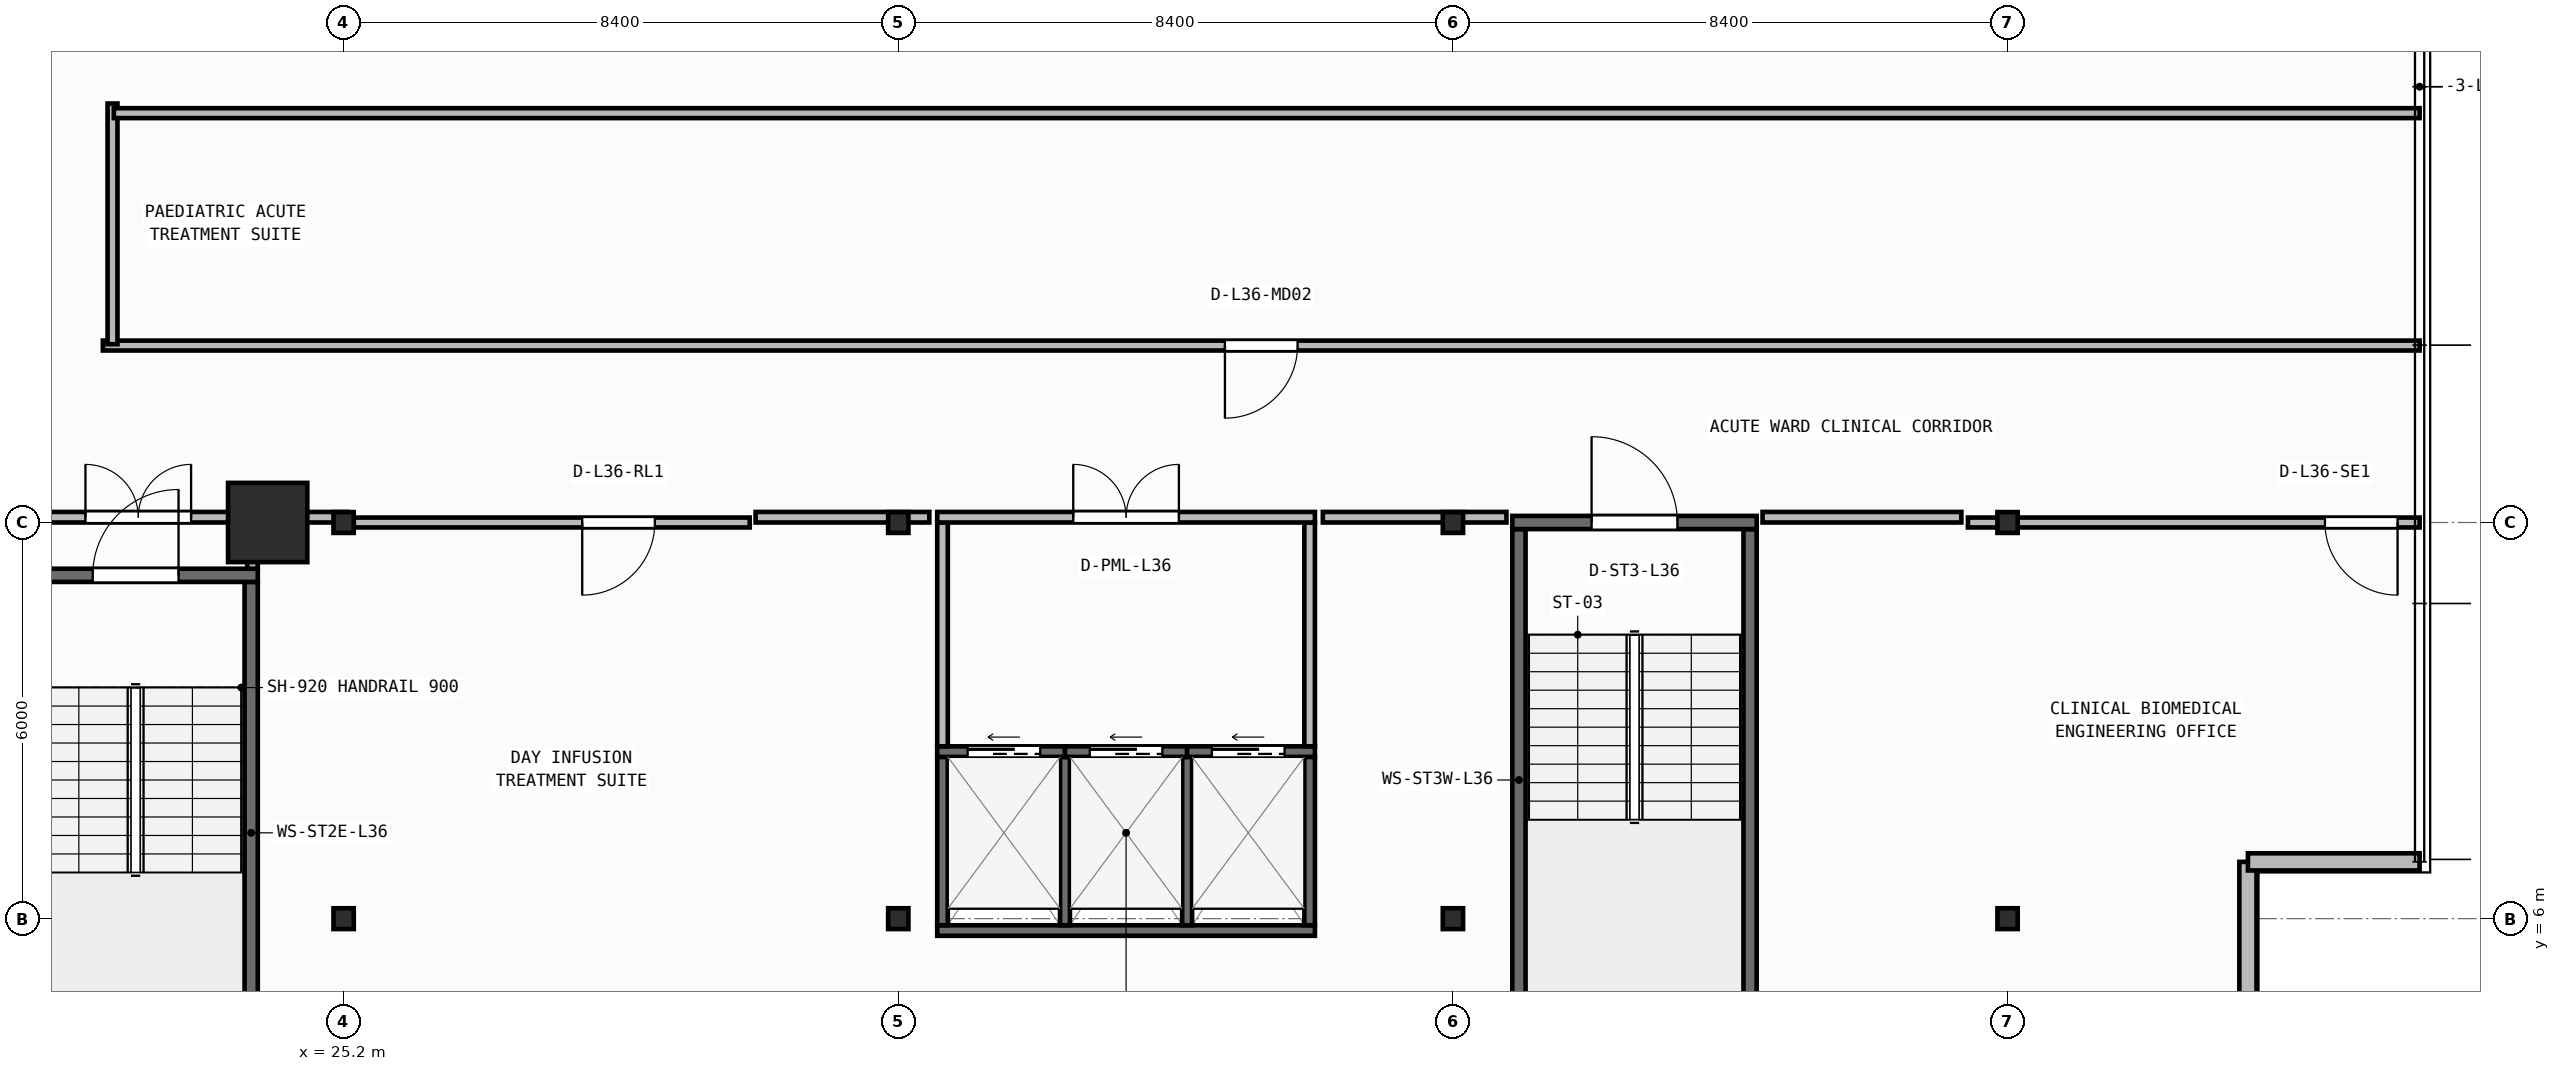
"""IFC4 building model, lengths in metres.
Left out: names, types, materials, properties, quantities, classifications, styles, units other than length and angle.
Written with IfcOpenShell. Run it as: python <this file> out.ifc"""

import sys

from ifc_helpers import new_model, si_unit, direction, frame, frame_2d, origin, origin_2d, place, context, subcontext, project, spatial, rectangle, i_section, extrude, element, fill, save


model = new_model("IFC4")
c1 = context("Model", 3, precision=1e-05, world=origin(), true_north=direction((0.0, 1.0)))
c2 = subcontext(c1, "Body", "Model", "MODEL_VIEW")
j1 = project(units=[si_unit("LENGTHUNIT", "METRE"), si_unit("PLANEANGLEUNIT", "RADIAN")], contexts=[c1])
p1 = place(None, origin())
s1 = spatial("IfcSite", under=j1, at=p1, CompositionType="ELEMENT")
p2 = place(p1, origin())
s2 = spatial("IfcBuilding", under=s1, at=p2, CompositionType="ELEMENT")
p3 = place(p2, frame((0.0, 0.0, 146.8)))
s3 = spatial("IfcBuildingStorey", under=s2, at=p3, CompositionType="ELEMENT", Elevation=146.8)
for number, where, z_axis, x_axis in (
    (1, (25.2, 6.0, 0.0), (0.0, 0.0, 1.0), (1.0, 0.0, 0.0)),
    (2, (33.6, 6.0, 0.0), (0.0, 0.0, 1.0), (1.0, 0.0, 0.0)),
    (3, (42.0, 6.0, 0.0), (0.0, 0.0, 1.0), (1.0, 0.0, 0.0)),
    (4, (50.4, 6.0, 0.0), (0.0, 0.0, 1.0), (1.0, 0.0, 0.0)),
):
    element("IfcColumn", number, at=place(p3, frame(where, z_axis=z_axis, x_axis=x_axis)), inside=s3, PredefinedType="COLUMN", context=c2, shape_type="SweptSolid", body=[
        extrude(i_section(OverallWidth=0.307, OverallDepth=0.315, WebThickness=0.012, FlangeThickness=0.019, FilletRadius=0.017, at=origin_2d()), origin(), (0.0, 0.0, 1.0), 3.95),
    ])
p4 = place(p3, frame((24.05, 12.0, 0.0), z_axis=(0.0, 0.0, 1.0), x_axis=(1.0, 0.0, 0.0)))
e5 = element("IfcColumn", 5, at=p4, inside=s3, PredefinedType="COLUMN", context=c2, shape_type="SweptSolid", body=[
    extrude(rectangle(XDim=1.2, YDim=1.2, at=origin_2d()), origin(), (0.0, 0.0, 1.0), 3.95),
])
for number, where, z_axis, x_axis in (
    (6, (25.2, 12.0, 0.0), (0.0, 0.0, 1.0), (1.0, 0.0, 0.0)),
    (7, (33.6, 12.0, 0.0), (0.0, 0.0, 1.0), (1.0, 0.0, 0.0)),
    (8, (42.0, 12.0, 0.0), (0.0, 0.0, 1.0), (1.0, 0.0, 0.0)),
    (9, (50.4, 12.0, 0.0), (0.0, 0.0, 1.0), (1.0, 0.0, 0.0)),
):
    element("IfcColumn", number, at=place(p3, frame(where, z_axis=z_axis, x_axis=x_axis)), inside=s3, PredefinedType="COLUMN", context=c2, shape_type="SweptSolid", body=[
        extrude(i_section(OverallWidth=0.307, OverallDepth=0.315, WebThickness=0.012, FlangeThickness=0.019, FilletRadius=0.017, at=origin_2d()), origin(), (0.0, 0.0, 1.0), 3.95),
    ])
p5 = place(p3, frame((54.04, 4.248, 0.0), z_axis=(0.0, 0.0, 1.0), x_axis=(0.0, 1.0, 0.0)))
e10 = element("IfcWall", 10, at=p5, inside=s3, PredefinedType="STANDARD", context=c2, shape_type="SweptSolid", body=[
    extrude(rectangle(XDim=2.612, YDim=0.26, at=frame_2d((1.306, 0.0))), origin(), (0.0, 0.0, 1.0), 3.71),
])
p6 = place(p3, frame((54.04, 6.86, 0.0), z_axis=(0.0, 0.0, 1.0), x_axis=(1.0, 0.0, 0.0)))
e11 = element("IfcWall", 11, at=p6, inside=s3, PredefinedType="STANDARD", context=c2, shape_type="SweptSolid", body=[
    extrude(rectangle(XDim=2.6, YDim=0.26, at=frame_2d((1.3, 0.0))), origin(), (0.0, 0.0, 1.0), 3.71),
])
p7 = place(p3, frame((23.8, 3.5, 0.0), z_axis=(0.0, 0.0, 1.0), x_axis=(0.0, 1.0, 0.0)))
e12 = element("IfcWall", 12, at=p7, inside=s3, PredefinedType="SHEAR", context=c2, shape_type="SweptSolid", body=[
    extrude(rectangle(XDim=7.6, YDim=0.2, at=frame_2d((3.8, 0.0))), origin(), (0.0, 0.0, 1.0), 3.71),
])
p8 = place(p3, frame((20.2, 11.2, 0.0), z_axis=(0.0, 0.0, 1.0), x_axis=(1.0, 0.0, 0.0)))
e13 = element("IfcWall", 13, at=p8, inside=s3, PredefinedType="SHEAR", context=c2, shape_type="SweptSolid", body=[
    extrude(rectangle(XDim=3.7, YDim=0.2, at=frame_2d((1.85, 0.0))), origin(), (0.0, 0.0, 1.0), 3.71),
])
p9 = place(p8, frame((1.2, 0.0, 0.0)))
e14 = element("IfcOpeningElement", 14, at=p9, cuts=e13, PredefinedType="OPENING", context=c2, shape_type="SweptSolid", body=[
    extrude(rectangle(XDim=1.3, YDim=2.15, at=frame_2d((0.65, 1.075))), frame((0.0, 0.11, 0.0), z_axis=(0.0, -1.0, 0.0), x_axis=(1.0, 0.0, 0.0)), (0.0, 0.0, 1.0), 0.22),
])
for number, where, z_axis, x_axis in (
    (15, (43.0, 4.3, 0.0), (0.0, 0.0, 1.0), (0.0, 1.0, 0.0)),
    (16, (46.5, 4.3, 0.0), (0.0, 0.0, 1.0), (0.0, 1.0, 0.0)),
):
    element("IfcWall", number, at=place(p3, frame(where, z_axis=z_axis, x_axis=x_axis)), inside=s3, PredefinedType="SHEAR", context=c2, shape_type="SweptSolid", body=[
        extrude(rectangle(XDim=7.6, YDim=0.2, at=frame_2d((3.8, 0.0))), origin(), (0.0, 0.0, 1.0), 3.71),
    ])
p10 = place(p3, frame((42.9, 12.0, 0.0), z_axis=(0.0, 0.0, 1.0), x_axis=(1.0, 0.0, 0.0)))
e17 = element("IfcWall", 17, at=p10, inside=s3, PredefinedType="SHEAR", context=c2, shape_type="SweptSolid", body=[
    extrude(rectangle(XDim=3.7, YDim=0.2, at=frame_2d((1.85, 0.0))), origin(), (0.0, 0.0, 1.0), 3.71),
])
p11 = place(p10, frame((1.2, 0.0, 0.0)))
e18 = element("IfcOpeningElement", 18, at=p11, cuts=e17, PredefinedType="OPENING", context=c2, shape_type="SweptSolid", body=[
    extrude(rectangle(XDim=1.3, YDim=2.15, at=frame_2d((0.65, 1.075))), frame((0.0, 0.11, 0.0), z_axis=(0.0, -1.0, 0.0), x_axis=(1.0, 0.0, 0.0)), (0.0, 0.0, 1.0), 0.22),
])
p12 = place(p3, frame((34.19, 5.82, 0.0), z_axis=(0.0, 0.0, 1.0), x_axis=(1.0, 0.0, 0.0)))
e19 = element("IfcWall", 19, at=p12, inside=s3, PredefinedType="SHEAR", context=c2, shape_type="SweptSolid", body=[
    extrude(rectangle(XDim=5.72, YDim=0.16, at=frame_2d((2.86, 0.0))), origin(), (0.0, 0.0, 1.0), 3.71),
])
for number, where, z_axis, x_axis in (
    (20, (34.27, 5.9, 0.0), (0.0, 0.0, 1.0), (0.0, 1.0, 0.0)),
    (21, (39.83, 5.9, 0.0), (0.0, 0.0, 1.0), (0.0, 1.0, 0.0)),
):
    element("IfcWall", number, at=place(p3, frame(where, z_axis=z_axis, x_axis=x_axis)), inside=s3, PredefinedType="SHEAR", context=c2, shape_type="SweptSolid", body=[
        extrude(rectangle(XDim=2.55, YDim=0.16, at=frame_2d((1.275, 0.0))), origin(), (0.0, 0.0, 1.0), 3.71),
    ])
for number, where, z_axis, x_axis in (
    (22, (36.125, 5.9, 0.0), (0.0, 0.0, 1.0), (0.0, 1.0, 0.0)),
    (23, (37.975, 5.9, 0.0), (0.0, 0.0, 1.0), (0.0, 1.0, 0.0)),
):
    element("IfcWall", number, at=place(p3, frame(where, z_axis=z_axis, x_axis=x_axis)), inside=s3, PredefinedType="SHEAR", context=c2, shape_type="SweptSolid", body=[
        extrude(rectangle(XDim=2.55, YDim=0.15, at=frame_2d((1.275, 0.0))), origin(), (0.0, 0.0, 1.0), 3.71),
    ])
p13 = place(p3, frame((34.19, 8.53, 0.0), z_axis=(0.0, 0.0, 1.0), x_axis=(1.0, 0.0, 0.0)))
e24 = element("IfcWall", 24, at=p13, inside=s3, PredefinedType="SHEAR", context=c2, shape_type="SweptSolid", body=[
    extrude(rectangle(XDim=1.935, YDim=0.16, at=frame_2d((0.968, 0.0))), origin(), (0.0, 0.0, 1.0), 3.71),
])
p14 = place(p13, frame((0.46, 0.0, 0.0)))
e25 = element("IfcOpeningElement", 25, at=p14, cuts=e24, PredefinedType="OPENING", context=c2, shape_type="SweptSolid", body=[
    extrude(rectangle(XDim=1.1, YDim=2.15, at=frame_2d((0.55, 1.075))), frame((0.0, 0.09, 0.0), z_axis=(0.0, -1.0, 0.0), x_axis=(1.0, 0.0, 0.0)), (0.0, 0.0, 1.0), 0.18),
])
p15 = place(p3, frame((36.125, 8.53, 0.0), z_axis=(0.0, 0.0, 1.0), x_axis=(1.0, 0.0, 0.0)))
e26 = element("IfcWall", 26, at=p15, inside=s3, PredefinedType="SHEAR", context=c2, shape_type="SweptSolid", body=[
    extrude(rectangle(XDim=1.85, YDim=0.16, at=frame_2d((0.925, 0.0))), origin(), (0.0, 0.0, 1.0), 3.71),
])
p16 = place(p15, frame((0.375, 0.0, 0.0)))
e27 = element("IfcOpeningElement", 27, at=p16, cuts=e26, PredefinedType="OPENING", context=c2, shape_type="SweptSolid", body=[
    extrude(rectangle(XDim=1.1, YDim=2.15, at=frame_2d((0.55, 1.075))), frame((0.0, 0.09, 0.0), z_axis=(0.0, -1.0, 0.0), x_axis=(1.0, 0.0, 0.0)), (0.0, 0.0, 1.0), 0.18),
])
p17 = place(p3, frame((37.975, 8.53, 0.0), z_axis=(0.0, 0.0, 1.0), x_axis=(1.0, 0.0, 0.0)))
e28 = element("IfcWall", 28, at=p17, inside=s3, PredefinedType="SHEAR", context=c2, shape_type="SweptSolid", body=[
    extrude(rectangle(XDim=1.935, YDim=0.16, at=frame_2d((0.967, 0.0))), origin(), (0.0, 0.0, 1.0), 3.71),
])
p18 = place(p17, frame((0.375, 0.0, 0.0)))
e29 = element("IfcOpeningElement", 29, at=p18, cuts=e28, PredefinedType="OPENING", context=c2, shape_type="SweptSolid", body=[
    extrude(rectangle(XDim=1.1, YDim=2.15, at=frame_2d((0.55, 1.075))), frame((0.0, 0.09, 0.0), z_axis=(0.0, -1.0, 0.0), x_axis=(1.0, 0.0, 0.0)), (0.0, 0.0, 1.0), 0.18),
])
p19 = place(p3, frame((20.28, 12.08, 0.0), z_axis=(0.0, 0.0, 1.0), x_axis=(1.0, 0.0, 0.0)))
e30 = element("IfcWall", 30, at=p19, inside=s3, PredefinedType="PARTITIONING", context=c2, shape_type="SweptSolid", body=[
    extrude(rectangle(XDim=3.62, YDim=0.16, at=frame_2d((1.81, 0.0))), origin(), (0.0, 0.0, 1.0), 3.083),
])
p20 = place(p19, frame((1.01, 0.0, 0.0)))
e31 = element("IfcOpeningElement", 31, at=p20, cuts=e30, PredefinedType="OPENING", context=c2, shape_type="SweptSolid", body=[
    extrude(rectangle(XDim=1.6, YDim=2.05, at=frame_2d((0.8, 1.025))), frame((0.0, 0.09, 0.0), z_axis=(0.0, -1.0, 0.0), x_axis=(1.0, 0.0, 0.0)), (0.0, 0.0, 1.0), 0.18),
])
p21 = place(p3, frame((23.82, 11.3, 0.0), z_axis=(0.0, 0.0, 1.0), x_axis=(0.0, 1.0, 0.0)))
e32 = element("IfcWall", 32, at=p21, inside=s3, PredefinedType="PARTITIONING", context=c2, shape_type="SweptSolid", body=[
    extrude(rectangle(XDim=0.7, YDim=0.16, at=frame_2d((0.35, 0.0))), origin(), (0.0, 0.0, 1.0), 3.71),
])
for number, where, z_axis, x_axis in (
    (33, (34.27, 8.61, 0.0), (0.0, 0.0, 1.0), (0.0, 1.0, 0.0)),
    (34, (39.83, 8.61, 0.0), (0.0, 0.0, 1.0), (0.0, 1.0, 0.0)),
):
    element("IfcWall", number, at=place(p3, frame(where, z_axis=z_axis, x_axis=x_axis)), inside=s3, PredefinedType="PARTITIONING", context=c2, shape_type="SweptSolid", body=[
        extrude(rectangle(XDim=3.39, YDim=0.16, at=frame_2d((1.695, 0.0))), origin(), (0.0, 0.0, 1.0), 3.71),
    ])
p22 = place(p3, frame((34.19, 12.08, 0.0), z_axis=(0.0, 0.0, 1.0), x_axis=(1.0, 0.0, 0.0)))
e35 = element("IfcWall", 35, at=p22, inside=s3, PredefinedType="PARTITIONING", context=c2, shape_type="SweptSolid", body=[
    extrude(rectangle(XDim=5.72, YDim=0.16, at=frame_2d((2.86, 0.0))), origin(), (0.0, 0.0, 1.0), 3.083),
])
p23 = place(p22, frame((2.06, 0.0, 0.0)))
e36 = element("IfcOpeningElement", 36, at=p23, cuts=e35, PredefinedType="OPENING", context=c2, shape_type="SweptSolid", body=[
    extrude(rectangle(XDim=1.6, YDim=2.05, at=frame_2d((0.8, 1.025))), frame((0.0, 0.09, 0.0), z_axis=(0.0, -1.0, 0.0), x_axis=(1.0, 0.0, 0.0)), (0.0, 0.0, 1.0), 0.18),
])
p24 = place(p3, frame((31.35, 12.0, 0.0), z_axis=(0.0, 0.0, 1.0), x_axis=(-1.0, 0.0, 0.0)))
e37 = element("IfcWall", 37, at=p24, inside=s3, PredefinedType="PARTITIONING", context=c2, shape_type="SweptSolid", body=[
    extrude(rectangle(XDim=5.997, YDim=0.15, at=frame_2d((2.998, 0.0))), origin(), (0.0, 0.0, 1.0), 3.083),
])
p25 = place(p24, frame((1.437, 0.0, 0.0)))
e38 = element("IfcOpeningElement", 38, at=p25, cuts=e37, PredefinedType="OPENING", context=c2, shape_type="SweptSolid", body=[
    extrude(rectangle(XDim=1.1, YDim=2.1, at=frame_2d((0.55, 1.05))), frame((0.0, 0.085, 0.0), z_axis=(0.0, -1.0, 0.0), x_axis=(1.0, 0.0, 0.0)), (0.0, 0.0, 1.0), 0.17),
])
p26 = place(p3, frame((56.64, 12.0, 0.0), z_axis=(0.0, 0.0, 1.0), x_axis=(-1.0, 0.0, 0.0)))
e39 = element("IfcWall", 39, at=p26, inside=s3, PredefinedType="PARTITIONING", context=c2, shape_type="SweptSolid", body=[
    extrude(rectangle(XDim=6.84, YDim=0.15, at=frame_2d((3.42, 0.0))), origin(), (0.0, 0.0, 1.0), 3.083),
])
p27 = place(p26, frame((0.333, 0.0, 0.0)))
e40 = element("IfcOpeningElement", 40, at=p27, cuts=e39, PredefinedType="OPENING", context=c2, shape_type="SweptSolid", body=[
    extrude(rectangle(XDim=1.1, YDim=2.1, at=frame_2d((0.55, 1.05))), frame((0.0, 0.085, 0.0), z_axis=(0.0, -1.0, 0.0), x_axis=(1.0, 0.0, 0.0)), (0.0, 0.0, 1.0), 0.17),
])
p28 = place(p3, frame((56.64, 14.68, 0.0), z_axis=(0.0, 0.0, 1.0), x_axis=(-1.0, 0.0, 0.0)))
e41 = element("IfcWall", 41, at=p28, inside=s3, PredefinedType="PARTITIONING", context=c2, shape_type="SweptSolid", body=[
    extrude(rectangle(XDim=35.086, YDim=0.15, at=frame_2d((17.543, 0.0))), origin(), (0.0, 0.0, 1.0), 3.71),
])
p29 = place(p28, frame((16.993, 0.0, 0.0)))
e42 = element("IfcOpeningElement", 42, at=p29, cuts=e41, PredefinedType="OPENING", context=c2, shape_type="SweptSolid", body=[
    extrude(rectangle(XDim=1.1, YDim=2.1, at=frame_2d((0.55, 1.05))), frame((0.0, 0.085, 0.0), z_axis=(0.0, -1.0, 0.0), x_axis=(1.0, 0.0, 0.0)), (0.0, 0.0, 1.0), 0.17),
])
p30 = place(p3, frame((21.7, 14.7, 0.0), z_axis=(0.0, 0.0, 1.0), x_axis=(0.0, 1.0, 0.0)))
e43 = element("IfcWall", 43, at=p30, inside=s3, PredefinedType="PARTITIONING", context=c2, shape_type="SweptSolid", body=[
    extrude(rectangle(XDim=3.646, YDim=0.15, at=frame_2d((1.823, 0.0))), origin(), (0.0, 0.0, 1.0), 3.71),
])
p31 = place(p3, frame((21.72, 18.2, 0.0), z_axis=(0.0, 0.0, 1.0), x_axis=(1.0, 0.0, 0.0)))
e44 = element("IfcWall", 44, at=p31, inside=s3, PredefinedType="PARTITIONING", context=c2, shape_type="SweptSolid", body=[
    extrude(rectangle(XDim=34.92, YDim=0.15, at=frame_2d((17.46, 0.0))), origin(), (0.0, 0.0, 1.0), 3.71),
])
p32 = place(p3, frame((24.02, 12.08, 0.0), z_axis=(0.0, 0.0, 1.0), x_axis=(1.0, 0.0, 0.0)))
e45 = element("IfcWall", 45, at=p32, inside=s3, PredefinedType="PARTITIONING", context=c2, shape_type="SweptSolid", body=[
    extrude(rectangle(XDim=1.244, YDim=0.16, at=frame_2d((0.622, 0.0))), origin(), (0.0, 0.0, 1.0), 3.083),
])
p33 = place(p3, frame((31.439, 12.08, 0.0), z_axis=(0.0, 0.0, 1.0), x_axis=(1.0, 0.0, 0.0)))
e46 = element("IfcWall", 46, at=p33, inside=s3, PredefinedType="PARTITIONING", context=c2, shape_type="SweptSolid", body=[
    extrude(rectangle(XDim=2.631, YDim=0.16, at=frame_2d((1.315, 0.0))), origin(), (0.0, 0.0, 1.0), 3.083),
])
p34 = place(p3, frame((40.03, 12.08, 0.0), z_axis=(0.0, 0.0, 1.0), x_axis=(1.0, 0.0, 0.0)))
e47 = element("IfcWall", 47, at=p34, inside=s3, PredefinedType="PARTITIONING", context=c2, shape_type="SweptSolid", body=[
    extrude(rectangle(XDim=2.781, YDim=0.16, at=frame_2d((1.39, 0.0))), origin(), (0.0, 0.0, 1.0), 3.083),
])
p35 = place(p3, frame((46.689, 12.08, 0.0), z_axis=(0.0, 0.0, 1.0), x_axis=(1.0, 0.0, 0.0)))
e48 = element("IfcWall", 48, at=p35, inside=s3, PredefinedType="PARTITIONING", context=c2, shape_type="SweptSolid", body=[
    extrude(rectangle(XDim=3.011, YDim=0.16, at=frame_2d((1.505, 0.0))), origin(), (0.0, 0.0, 1.0), 3.083),
])
p36 = place(p9, origin())
e49 = element("IfcDoor", 49, at=p36, inside=s3, OperationType="SINGLE_SWING_RIGHT", PredefinedType="DOOR", context=c2, shape_type="SweptSolid", body=[
    extrude(rectangle(XDim=1.3, YDim=2.15, at=frame_2d((0.65, 1.075))), frame((0.0, 0.025, 0.0), z_axis=(0.0, -1.0, 0.0), x_axis=(1.0, 0.0, 0.0)), (0.0, 0.0, 1.0), 0.05),
])
fill(e14, e49)
p37 = place(p11, origin())
e50 = element("IfcDoor", 50, at=p37, inside=s3, OperationType="SINGLE_SWING_LEFT", PredefinedType="DOOR", context=c2, shape_type="SweptSolid", body=[
    extrude(rectangle(XDim=1.3, YDim=2.15, at=frame_2d((0.65, 1.075))), frame((0.0, 0.025, 0.0), z_axis=(0.0, -1.0, 0.0), x_axis=(1.0, 0.0, 0.0)), (0.0, 0.0, 1.0), 0.05),
])
fill(e18, e50)
p38 = place(p14, origin())
e51 = element("IfcDoor", 51, at=p38, inside=s3, OperationType="SLIDING_TO_LEFT", PredefinedType="DOOR", context=c2, shape_type="SweptSolid", body=[
    extrude(rectangle(XDim=1.1, YDim=2.15, at=frame_2d((0.55, 1.075))), frame((0.0, 0.025, 0.0), z_axis=(0.0, -1.0, 0.0), x_axis=(1.0, 0.0, 0.0)), (0.0, 0.0, 1.0), 0.05),
])
fill(e25, e51)
p39 = place(p16, origin())
e52 = element("IfcDoor", 52, at=p39, inside=s3, OperationType="SLIDING_TO_LEFT", PredefinedType="DOOR", context=c2, shape_type="SweptSolid", body=[
    extrude(rectangle(XDim=1.1, YDim=2.15, at=frame_2d((0.55, 1.075))), frame((0.0, 0.025, 0.0), z_axis=(0.0, -1.0, 0.0), x_axis=(1.0, 0.0, 0.0)), (0.0, 0.0, 1.0), 0.05),
])
fill(e27, e52)
p40 = place(p18, origin())
e53 = element("IfcDoor", 53, at=p40, inside=s3, OperationType="SLIDING_TO_LEFT", PredefinedType="DOOR", context=c2, shape_type="SweptSolid", body=[
    extrude(rectangle(XDim=1.1, YDim=2.15, at=frame_2d((0.55, 1.075))), frame((0.0, 0.025, 0.0), z_axis=(0.0, -1.0, 0.0), x_axis=(1.0, 0.0, 0.0)), (0.0, 0.0, 1.0), 0.05),
])
fill(e29, e53)
p41 = place(p20, origin())
e54 = element("IfcDoor", 54, at=p41, inside=s3, OperationType="DOUBLE_DOOR_SINGLE_SWING", PredefinedType="DOOR", context=c2, shape_type="SweptSolid", body=[
    extrude(rectangle(XDim=1.6, YDim=2.05, at=frame_2d((0.8, 1.025))), frame((0.0, 0.025, 0.0), z_axis=(0.0, -1.0, 0.0), x_axis=(1.0, 0.0, 0.0)), (0.0, 0.0, 1.0), 0.05),
])
fill(e31, e54)
p42 = place(p23, origin())
e55 = element("IfcDoor", 55, at=p42, inside=s3, OperationType="DOUBLE_DOOR_SINGLE_SWING", PredefinedType="DOOR", context=c2, shape_type="SweptSolid", body=[
    extrude(rectangle(XDim=1.6, YDim=2.05, at=frame_2d((0.8, 1.025))), frame((0.0, 0.025, 0.0), z_axis=(0.0, -1.0, 0.0), x_axis=(1.0, 0.0, 0.0)), (0.0, 0.0, 1.0), 0.05),
])
fill(e36, e55)
p43 = place(p25, origin())
e56 = element("IfcDoor", 56, at=p43, inside=s3, OperationType="SINGLE_SWING_RIGHT", PredefinedType="DOOR", context=c2, shape_type="SweptSolid", body=[
    extrude(rectangle(XDim=1.1, YDim=2.1, at=frame_2d((0.55, 1.05))), frame((0.0, 0.025, 0.0), z_axis=(0.0, -1.0, 0.0), x_axis=(1.0, 0.0, 0.0)), (0.0, 0.0, 1.0), 0.05),
])
fill(e38, e56)
p44 = place(p27, origin())
e57 = element("IfcDoor", 57, at=p44, inside=s3, OperationType="SINGLE_SWING_LEFT", PredefinedType="DOOR", context=c2, shape_type="SweptSolid", body=[
    extrude(rectangle(XDim=1.1, YDim=2.1, at=frame_2d((0.55, 1.05))), frame((0.0, 0.025, 0.0), z_axis=(0.0, -1.0, 0.0), x_axis=(1.0, 0.0, 0.0)), (0.0, 0.0, 1.0), 0.05),
])
fill(e40, e57)
p45 = place(p29, origin())
e58 = element("IfcDoor", 58, at=p45, inside=s3, OperationType="SINGLE_SWING_RIGHT", PredefinedType="DOOR", context=c2, shape_type="SweptSolid", body=[
    extrude(rectangle(XDim=1.1, YDim=2.1, at=frame_2d((0.55, 1.05))), frame((0.0, 0.025, 0.0), z_axis=(0.0, -1.0, 0.0), x_axis=(1.0, 0.0, 0.0)), (0.0, 0.0, 1.0), 0.05),
])
fill(e42, e58)
save(model, sys.argv[1])
